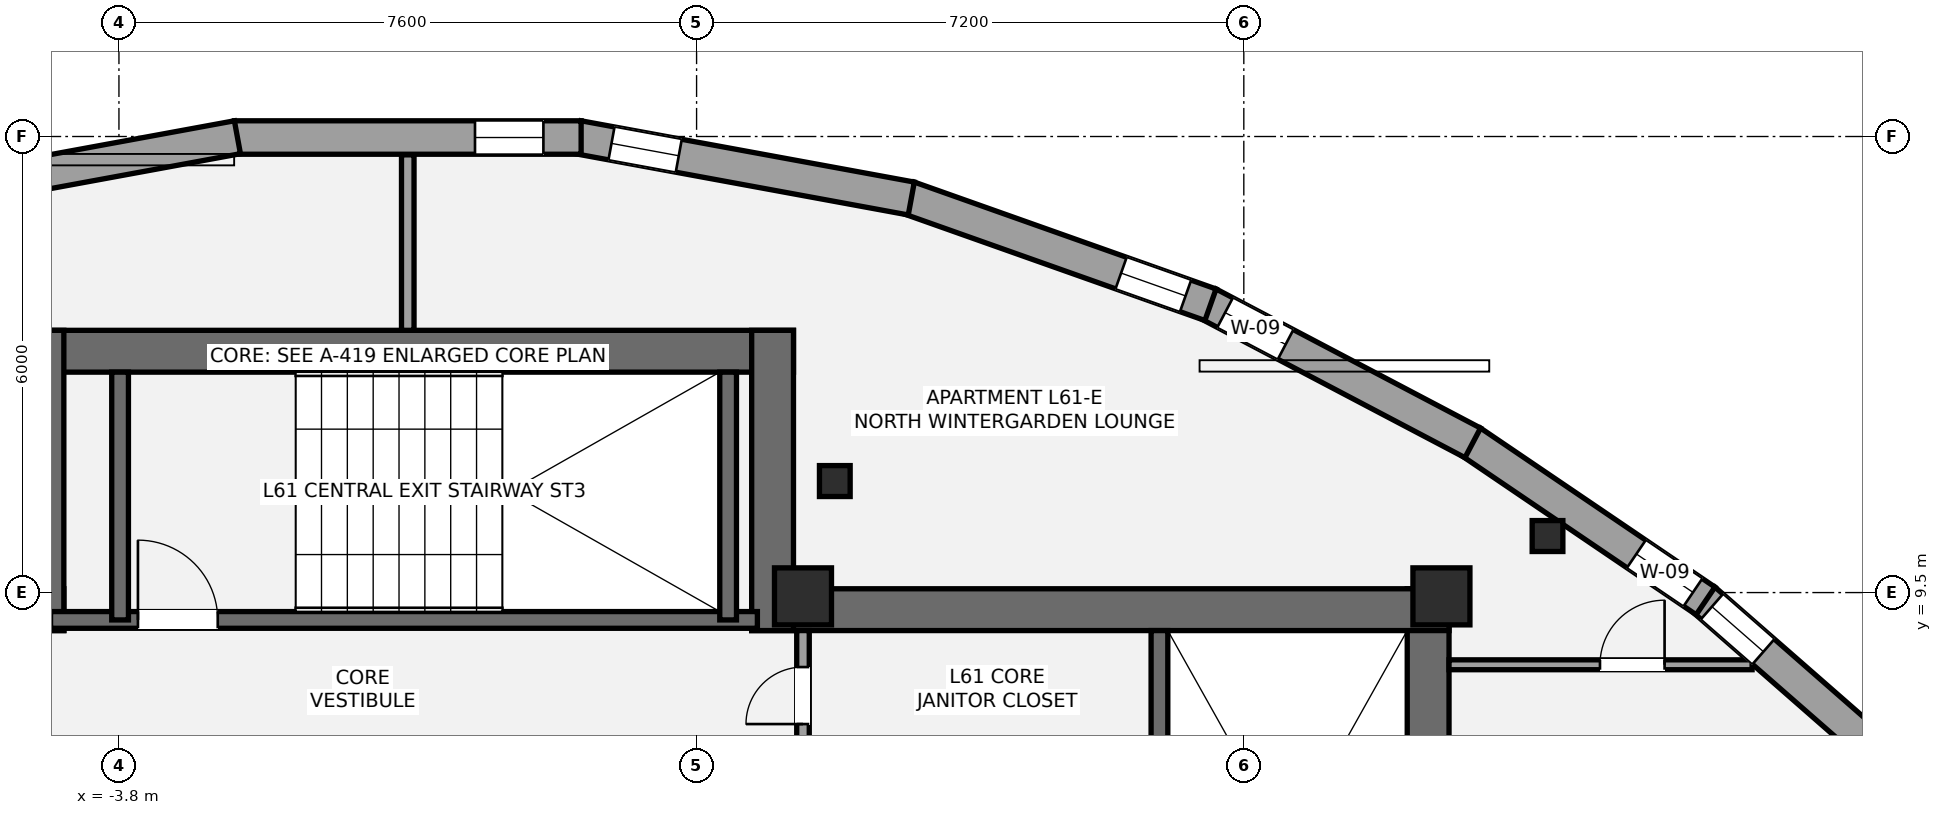
"""IFC4 building model, lengths in metres.
Left out: names, types, materials, properties, quantities, classifications, styles, units other than length and angle.
Written with IfcOpenShell. Run it as: python <this file> out.ifc"""

import sys

from ifc_helpers import new_model, si_unit, direction, frame, frame_2d, origin, origin_2d, place, context, subcontext, project, spatial, rectangle, i_section, extrude, element, fill, save


model = new_model("IFC4")
c1 = context("Model", 3, precision=1e-05, world=origin(), true_north=direction((0.0, 1.0)))
c2 = subcontext(c1, "Body", "Model", "MODEL_VIEW")
j1 = project(units=[si_unit("LENGTHUNIT", "METRE"), si_unit("PLANEANGLEUNIT", "RADIAN")], contexts=[c1])
p1 = place(None, origin())
s1 = spatial("IfcSite", under=j1, at=p1, CompositionType="ELEMENT")
p2 = place(p1, origin())
s2 = spatial("IfcBuilding", under=s1, at=p2, CompositionType="ELEMENT")
p3 = place(p2, frame((0.0, 0.0, 219.45)))
s3 = spatial("IfcBuildingStorey", under=s2, at=p3, CompositionType="ELEMENT", Elevation=219.45)
p4 = place(p3, frame((-13.7, 9.275, 0.0), z_axis=(0.0, 0.0, 1.0), x_axis=(1.0, 0.0, 0.0)))
e1 = element("IfcWall", 1, at=p4, inside=s3, PredefinedType="SHEAR", context=c2, shape_type="SweptSolid", body=[
    extrude(rectangle(XDim=9.175, YDim=0.55, at=frame_2d((4.587, 0.0))), origin(), (0.0, 0.0, 1.0), 3.15),
])
p5 = place(p3, frame((13.425, 1.3, 0.0), z_axis=(0.0, 0.0, 1.0), x_axis=(0.0, 1.0, 0.0)))
e2 = element("IfcWall", 2, at=p5, inside=s3, PredefinedType="SHEAR", context=c2, shape_type="SweptSolid", body=[
    extrude(rectangle(XDim=8.25, YDim=0.55, at=frame_2d((4.125, 0.0))), origin(), (0.0, 0.0, 1.0), 3.15),
])
p6 = place(p3, frame((4.525, 9.275, 0.0), z_axis=(0.0, 0.0, 1.0), x_axis=(1.0, 0.0, 0.0)))
e3 = element("IfcWall", 3, at=p6, inside=s3, PredefinedType="SHEAR", context=c2, shape_type="SweptSolid", body=[
    extrude(rectangle(XDim=9.175, YDim=0.55, at=frame_2d((4.587, 0.0))), origin(), (0.0, 0.0, 1.0), 3.15),
])
p7 = place(p3, frame((9.89, 1.85, 0.0), z_axis=(0.0, 0.0, 1.0), x_axis=(0.0, 1.0, 0.0)))
e4 = element("IfcWall", 4, at=p7, inside=s3, PredefinedType="SHEAR", context=c2, shape_type="SweptSolid", body=[
    extrude(rectangle(XDim=7.15, YDim=0.22, at=frame_2d((3.575, 0.0))), origin(), (0.0, 0.0, 1.0), 3.15),
])
p8 = place(p3, frame((-5.075, 12.675, 0.0), z_axis=(0.0, 0.0, 1.0), x_axis=(1.0, 0.0, 0.0)))
e5 = element("IfcWall", 5, at=p8, inside=s3, PredefinedType="SHEAR", context=c2, shape_type="SweptSolid", body=[
    extrude(rectangle(XDim=10.15, YDim=0.55, at=frame_2d((5.075, 0.0))), origin(), (0.0, 0.0, 1.0), 3.15),
])
for number, where, z_axis, x_axis in (
    (6, (-4.8, 9.0, 0.0), (0.0, 0.0, 1.0), (0.0, 1.0, 0.0)),
    (7, (4.8, 9.0, 0.0), (0.0, 0.0, 1.0), (0.0, 1.0, 0.0)),
):
    element("IfcWall", number, at=place(p3, frame(where, z_axis=z_axis, x_axis=x_axis)), inside=s3, PredefinedType="SHEAR", context=c2, shape_type="SweptSolid", body=[
        extrude(rectangle(XDim=3.95, YDim=0.55, at=frame_2d((1.975, 0.0))), origin(), (0.0, 0.0, 1.0), 3.15),
    ])
p9 = place(p3, frame((-4.7, 9.14, 0.0), z_axis=(0.0, 0.0, 1.0), x_axis=(1.0, 0.0, 0.0)))
e8 = element("IfcWall", 8, at=p9, inside=s3, PredefinedType="SHEAR", context=c2, shape_type="SweptSolid", body=[
    extrude(rectangle(XDim=9.3, YDim=0.22, at=frame_2d((4.65, 0.0))), origin(), (0.0, 0.0, 1.0), 3.15),
])
p10 = place(p9, frame((1.15, 0.0, 0.0)))
e9 = element("IfcOpeningElement", 9, at=p10, cuts=e8, PredefinedType="OPENING", context=c2, shape_type="SweptSolid", body=[
    extrude(rectangle(XDim=1.05, YDim=2.15, at=frame_2d((0.525, 1.075))), frame((0.0, 0.12, 0.0), z_axis=(0.0, -1.0, 0.0), x_axis=(1.0, 0.0, 0.0)), (0.0, 0.0, 1.0), 0.24),
])
for number, where, z_axis, x_axis in (
    (10, (-3.785, 9.14, 0.0), (0.0, 0.0, 1.0), (0.0, 1.0, 0.0)),
    (11, (4.215, 9.14, 0.0), (0.0, 0.0, 1.0), (0.0, 1.0, 0.0)),
):
    element("IfcWall", number, at=place(p3, frame(where, z_axis=z_axis, x_axis=x_axis)), inside=s3, PredefinedType="SHEAR", context=c2, shape_type="SweptSolid", body=[
        extrude(rectangle(XDim=3.26, YDim=0.22, at=frame_2d((1.63, 0.0))), origin(), (0.0, 0.0, 1.0), 3.15),
    ])
for number, where, z_axis, x_axis in (
    (12, (5.2, 9.45, 0.0), (0.0, 0.0, 1.0), (1.0, 0.0, 0.0)),
    (13, (13.6, 9.45, 0.0), (0.0, 0.0, 1.0), (1.0, 0.0, 0.0)),
):
    element("IfcColumn", number, at=place(p3, frame(where, z_axis=z_axis, x_axis=x_axis)), inside=s3, PredefinedType="PILASTER", context=c2, shape_type="SweptSolid", body=[
        extrude(rectangle(XDim=0.75, YDim=0.75, at=origin_2d()), origin(), (0.0, 0.0, 1.0), 3.15),
    ])
for number, where, z_axis, x_axis in (
    (14, (14.996, 10.244, 0.0), (0.0, 0.0, 1.0), (1.0, 0.0, 0.0)),
    (15, (5.619, 10.967, 0.0), (0.0, 0.0, 1.0), (1.0, 0.0, 0.0)),
):
    element("IfcColumn", number, at=place(p3, frame(where, z_axis=z_axis, x_axis=x_axis)), inside=s3, PredefinedType="COLUMN", context=c2, shape_type="SweptSolid", body=[
        extrude(i_section(OverallWidth=0.404, OverallDepth=0.407, WebThickness=0.027, FlangeThickness=0.044, at=origin_2d()), origin(), (0.0, 0.0, 1.0), 3.15),
    ])
p11 = place(p3, frame((17.054, 9.407, 0.0), z_axis=(0.0, 0.0, 1.0), x_axis=(0.752758077019, -0.658297256172, 0.0)))
e16 = element("IfcWall", 16, at=p11, inside=s3, PredefinedType="STANDARD", context=c2, shape_type="SweptSolid", body=[
    extrude(rectangle(XDim=3.585, YDim=0.44, at=frame_2d((1.792, 0.0))), origin(), (0.0, 0.0, 1.0), 2.336),
])
p12 = place(p11, frame((0.14, 0.0, 0.42)))
e17 = element("IfcOpeningElement", 17, at=p12, cuts=e16, PredefinedType="OPENING", context=c2, shape_type="SweptSolid", body=[
    extrude(rectangle(XDim=0.9, YDim=1.35, at=frame_2d((0.45, 0.675))), frame((0.0, 0.23, 0.0), z_axis=(0.0, -1.0, 0.0), x_axis=(1.0, 0.0, 0.0)), (0.0, 0.0, 1.0), 0.46),
])
p13 = place(p3, frame((13.991, 11.482, 0.0), z_axis=(0.0, 0.0, 1.0), x_axis=(0.827609463482, -0.56130435234, 0.0)))
e18 = element("IfcWall", 18, at=p13, inside=s3, PredefinedType="STANDARD", context=c2, shape_type="SweptSolid", body=[
    extrude(rectangle(XDim=3.727, YDim=0.44, at=frame_2d((1.863, 0.0))), origin(), (0.0, 0.0, 1.0), 2.336),
])
p14 = place(p13, frame((2.626, 0.0, 0.42)))
e19 = element("IfcOpeningElement", 19, at=p14, cuts=e18, PredefinedType="OPENING", context=c2, shape_type="SweptSolid", body=[
    extrude(rectangle(XDim=0.9, YDim=1.35, at=frame_2d((0.45, 0.675))), frame((0.0, 0.23, 0.0), z_axis=(0.0, -1.0, 0.0), x_axis=(1.0, 0.0, 0.0)), (0.0, 0.0, 1.0), 0.46),
])
p15 = place(p3, frame((10.533, 13.3, 0.0), z_axis=(0.0, 0.0, 1.0), x_axis=(0.885047506895, -0.465500709493, 0.0)))
e20 = element("IfcWall", 20, at=p15, inside=s3, PredefinedType="STANDARD", context=c2, shape_type="SweptSolid", body=[
    extrude(rectangle(XDim=3.931, YDim=0.44, at=frame_2d((1.966, 0.0))), origin(), (0.0, 0.0, 1.0), 2.336),
])
p16 = place(p15, frame((0.25, 0.0, 0.58)))
e21 = element("IfcOpeningElement", 21, at=p16, cuts=e20, PredefinedType="OPENING", context=c2, shape_type="SweptSolid", body=[
    extrude(rectangle(XDim=0.9, YDim=1.35, at=frame_2d((0.45, 0.675))), frame((0.0, 0.23, 0.0), z_axis=(0.0, -1.0, 0.0), x_axis=(1.0, 0.0, 0.0)), (0.0, 0.0, 1.0), 0.46),
])
p17 = place(p3, frame((6.591, 14.693, 0.0), z_axis=(0.0, 0.0, 1.0), x_axis=(0.942617344196, -0.333875040128, 0.0)))
e22 = element("IfcWall", 22, at=p17, inside=s3, PredefinedType="STANDARD", context=c2, shape_type="SweptSolid", body=[
    extrude(rectangle(XDim=4.212, YDim=0.44, at=frame_2d((2.106, 0.0))), origin(), (0.0, 0.0, 1.0), 2.336),
])
p18 = place(p17, frame((2.964, 0.0, 0.58)))
e23 = element("IfcOpeningElement", 23, at=p18, cuts=e22, PredefinedType="OPENING", context=c2, shape_type="SweptSolid", body=[
    extrude(rectangle(XDim=0.9, YDim=1.35, at=frame_2d((0.45, 0.675))), frame((0.0, 0.23, 0.0), z_axis=(0.0, -1.0, 0.0), x_axis=(1.0, 0.0, 0.0)), (0.0, 0.0, 1.0), 0.46),
])
p19 = place(p3, frame((2.241, 15.49, 0.0), z_axis=(0.0, 0.0, 1.0), x_axis=(0.983508612793, -0.180861296472, 0.0)))
e24 = element("IfcWall", 24, at=p19, inside=s3, PredefinedType="STANDARD", context=c2, shape_type="SweptSolid", body=[
    extrude(rectangle(XDim=4.457, YDim=0.44, at=frame_2d((2.229, 0.0))), origin(), (0.0, 0.0, 1.0), 2.336),
])
p20 = place(p19, frame((0.447, 0.0, 0.58)))
e25 = element("IfcOpeningElement", 25, at=p20, cuts=e24, PredefinedType="OPENING", context=c2, shape_type="SweptSolid", body=[
    extrude(rectangle(XDim=0.9, YDim=1.35, at=frame_2d((0.45, 0.675))), frame((0.0, 0.23, 0.0), z_axis=(0.0, -1.0, 0.0), x_axis=(1.0, 0.0, 0.0)), (0.0, 0.0, 1.0), 0.46),
])
p21 = place(p3, frame((-2.281, 15.487, 0.0), z_axis=(0.0, 0.0, 1.0), x_axis=(1.0, 0.0, 0.0)))
e26 = element("IfcWall", 26, at=p21, inside=s3, PredefinedType="STANDARD", context=c2, shape_type="SweptSolid", body=[
    extrude(rectangle(XDim=4.562, YDim=0.44, at=frame_2d((2.281, 0.0))), origin(), (0.0, 0.0, 1.0), 2.336),
])
p22 = place(p21, frame((3.166, 0.0, 0.58)))
e27 = element("IfcOpeningElement", 27, at=p22, cuts=e26, PredefinedType="OPENING", context=c2, shape_type="SweptSolid", body=[
    extrude(rectangle(XDim=0.9, YDim=1.35, at=frame_2d((0.45, 0.675))), frame((0.0, 0.23, 0.0), z_axis=(0.0, -1.0, 0.0), x_axis=(1.0, 0.0, 0.0)), (0.0, 0.0, 1.0), 0.46),
])
p23 = place(p3, frame((-6.625, 14.684, 0.0), z_axis=(0.0, 0.0, 1.0), x_axis=(0.983508612793, 0.180861296472, 0.0)))
e28 = element("IfcWall", 28, at=p23, inside=s3, PredefinedType="STANDARD", context=c2, shape_type="SweptSolid", body=[
    extrude(rectangle(XDim=4.457, YDim=0.44, at=frame_2d((2.229, 0.0))), origin(), (0.0, 0.0, 1.0), 2.336),
])
p24 = place(p23, frame((0.447, 0.0, 0.58)))
e29 = element("IfcOpeningElement", 29, at=p24, cuts=e28, PredefinedType="OPENING", context=c2, shape_type="SweptSolid", body=[
    extrude(rectangle(XDim=0.9, YDim=1.35, at=frame_2d((0.45, 0.675))), frame((0.0, 0.23, 0.0), z_axis=(0.0, -1.0, 0.0), x_axis=(1.0, 0.0, 0.0)), (0.0, 0.0, 1.0), 0.46),
])
p25 = place(p3, frame((5.2, 7.42, 0.0), z_axis=(0.0, 0.0, 1.0), x_axis=(0.0, 1.0, 0.0)))
e30 = element("IfcWall", 30, at=p25, inside=s3, PredefinedType="PARTITIONING", context=c2, shape_type="SweptSolid", body=[
    extrude(rectangle(XDim=1.58, YDim=0.165, at=frame_2d((0.79, 0.0))), origin(), (0.0, 0.0, 1.0), 2.97),
])
p26 = place(p25, frame((0.35, 0.0, 0.0)))
e31 = element("IfcOpeningElement", 31, at=p26, cuts=e30, PredefinedType="OPENING", context=c2, shape_type="SweptSolid", body=[
    extrude(rectangle(XDim=0.75, YDim=2.1, at=frame_2d((0.375, 1.05))), frame((0.0, 0.093, 0.0), z_axis=(0.0, -1.0, 0.0), x_axis=(1.0, 0.0, 0.0)), (0.0, 0.0, 1.0), 0.185),
])
p27 = place(p3, frame((0.0, 12.95, 0.0), z_axis=(0.0, 0.0, 1.0), x_axis=(0.0, 1.0, 0.0)))
e32 = element("IfcWall", 32, at=p27, inside=s3, PredefinedType="PARTITIONING", context=c2, shape_type="SweptSolid", body=[
    extrude(rectangle(XDim=2.309, YDim=0.165, at=frame_2d((1.154, 0.0))), origin(), (0.0, 0.0, 1.0), 2.97),
])
p28 = place(p3, frame((13.7, 8.55, 0.0), z_axis=(0.0, 0.0, 1.0), x_axis=(1.0, 0.0, 0.0)))
e33 = element("IfcWall", 33, at=p28, inside=s3, PredefinedType="PARTITIONING", context=c2, shape_type="SweptSolid", body=[
    extrude(rectangle(XDim=3.988, YDim=0.13, at=frame_2d((1.994, 0.0))), origin(), (0.0, 0.0, 1.0), 2.423),
])
p29 = place(p28, frame((1.986, 0.0, 0.0)))
e34 = element("IfcOpeningElement", 34, at=p29, cuts=e33, PredefinedType="OPENING", context=c2, shape_type="SweptSolid", body=[
    extrude(rectangle(XDim=0.85, YDim=2.1, at=frame_2d((0.425, 1.05))), frame((0.0, 0.075, 0.0), z_axis=(0.0, -1.0, 0.0), x_axis=(1.0, 0.0, 0.0)), (0.0, 0.0, 1.0), 0.15),
])
p30 = place(p14, origin())
e35 = element("IfcWindow", 35, at=p30, inside=s3, PartitioningType="SINGLE_PANEL", PredefinedType="WINDOW", context=c2, shape_type="SweptSolid", body=[
    extrude(rectangle(XDim=0.9, YDim=1.35, at=frame_2d((0.45, 0.675))), frame((0.0, -0.01, 0.0), z_axis=(0.0, -1.0, 0.0), x_axis=(1.0, 0.0, 0.0)), (0.0, 0.0, 1.0), 0.06),
])
fill(e19, e35)
p31 = place(p16, origin())
e36 = element("IfcWindow", 36, at=p31, inside=s3, PartitioningType="SINGLE_PANEL", PredefinedType="WINDOW", context=c2, shape_type="SweptSolid", body=[
    extrude(rectangle(XDim=0.9, YDim=1.35, at=frame_2d((0.45, 0.675))), frame((0.0, -0.01, 0.0), z_axis=(0.0, -1.0, 0.0), x_axis=(1.0, 0.0, 0.0)), (0.0, 0.0, 1.0), 0.06),
])
fill(e21, e36)
p32 = place(p18, origin())
e37 = element("IfcWindow", 37, at=p32, inside=s3, PartitioningType="SINGLE_PANEL", PredefinedType="WINDOW", context=c2, shape_type="SweptSolid", body=[
    extrude(rectangle(XDim=0.9, YDim=1.35, at=frame_2d((0.45, 0.675))), frame((0.0, -0.01, 0.0), z_axis=(0.0, -1.0, 0.0), x_axis=(1.0, 0.0, 0.0)), (0.0, 0.0, 1.0), 0.06),
])
fill(e23, e37)
p33 = place(p20, origin())
e38 = element("IfcWindow", 38, at=p33, inside=s3, PartitioningType="SINGLE_PANEL", PredefinedType="WINDOW", context=c2, shape_type="SweptSolid", body=[
    extrude(rectangle(XDim=0.9, YDim=1.35, at=frame_2d((0.45, 0.675))), frame((0.0, -0.01, 0.0), z_axis=(0.0, -1.0, 0.0), x_axis=(1.0, 0.0, 0.0)), (0.0, 0.0, 1.0), 0.06),
])
fill(e25, e38)
p34 = place(p22, origin())
e39 = element("IfcWindow", 39, at=p34, inside=s3, PartitioningType="SINGLE_PANEL", PredefinedType="WINDOW", context=c2, shape_type="SweptSolid", body=[
    extrude(rectangle(XDim=0.9, YDim=1.35, at=frame_2d((0.45, 0.675))), frame((0.0, -0.01, 0.0), z_axis=(0.0, -1.0, 0.0), x_axis=(1.0, 0.0, 0.0)), (0.0, 0.0, 1.0), 0.06),
])
fill(e27, e39)
p35 = place(p12, origin())
e40 = element("IfcWindow", 40, at=p35, inside=s3, PartitioningType="SINGLE_PANEL", PredefinedType="WINDOW", context=c2, shape_type="SweptSolid", body=[
    extrude(rectangle(XDim=0.9, YDim=1.35, at=frame_2d((0.45, 0.675))), frame((0.0, -0.01, 0.0), z_axis=(0.0, -1.0, 0.0), x_axis=(1.0, 0.0, 0.0)), (0.0, 0.0, 1.0), 0.06),
])
fill(e17, e40)
p36 = place(p10, origin())
e41 = element("IfcDoor", 41, at=p36, inside=s3, OperationType="SINGLE_SWING_LEFT", PredefinedType="DOOR", context=c2, shape_type="SweptSolid", body=[
    extrude(rectangle(XDim=1.05, YDim=2.15, at=frame_2d((0.525, 1.075))), frame((0.0, 0.025, 0.0), z_axis=(0.0, -1.0, 0.0), x_axis=(1.0, 0.0, 0.0)), (0.0, 0.0, 1.0), 0.05),
])
fill(e9, e41)
p37 = place(p26, origin())
e42 = element("IfcDoor", 42, at=p37, inside=s3, OperationType="SINGLE_SWING_LEFT", PredefinedType="DOOR", context=c2, shape_type="SweptSolid", body=[
    extrude(rectangle(XDim=0.75, YDim=2.1, at=frame_2d((0.375, 1.05))), frame((0.0, 0.025, 0.0), z_axis=(0.0, -1.0, 0.0), x_axis=(1.0, 0.0, 0.0)), (0.0, 0.0, 1.0), 0.05),
])
fill(e31, e42)
p38 = place(p29, origin())
e43 = element("IfcDoor", 43, at=p38, inside=s3, OperationType="SINGLE_SWING_RIGHT", PredefinedType="DOOR", context=c2, shape_type="SweptSolid", body=[
    extrude(rectangle(XDim=0.85, YDim=2.1, at=frame_2d((0.425, 1.05))), frame((0.0, 0.025, 0.0), z_axis=(0.0, -1.0, 0.0), x_axis=(1.0, 0.0, 0.0)), (0.0, 0.0, 1.0), 0.05),
])
fill(e34, e43)
save(model, sys.argv[1])
